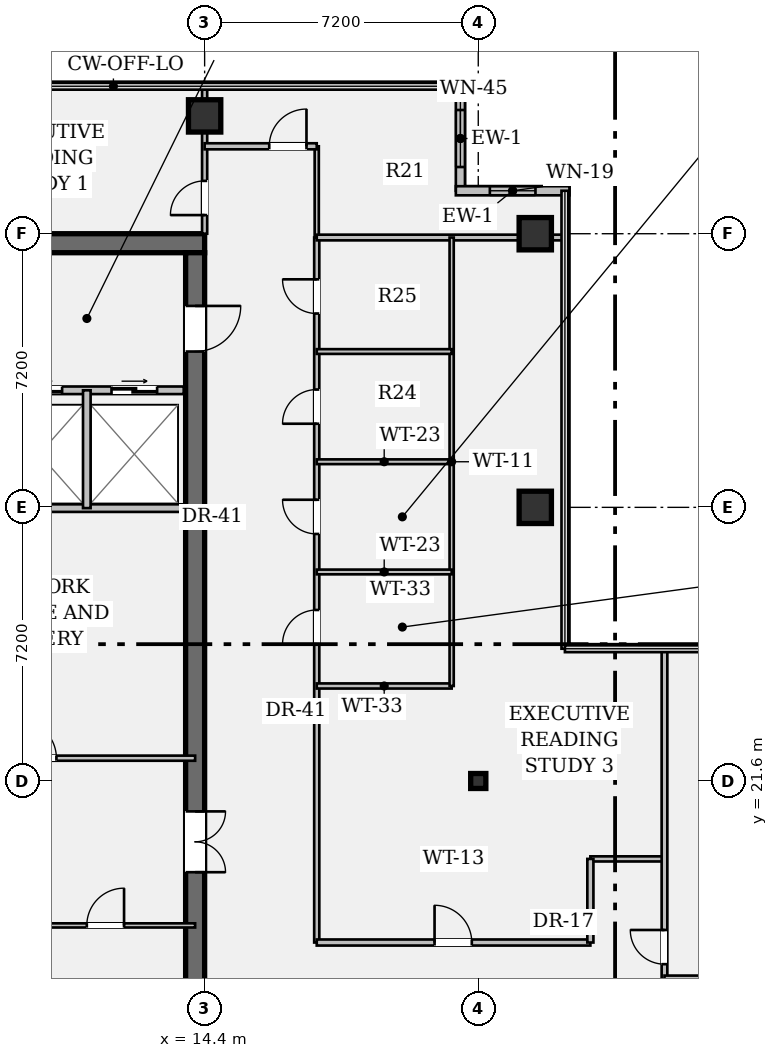
"""IFC4 building model, lengths in metres.
Left out: names, types, materials, properties, quantities, classifications, styles, units other than length and angle.
Written with IfcOpenShell. Run it as: python <this file> out.ifc"""

import sys

from ifc_helpers import new_model, si_unit, direction, frame, frame_2d, origin, origin_2d, place, context, subcontext, project, spatial, rectangle, hollow_rectangle, i_section, extrude, element, fill, save


model = new_model("IFC4")
c1 = context("Model", 3, precision=1e-05, world=origin(), true_north=direction((0.0, 1.0)))
c2 = subcontext(c1, "Body", "Model", "MODEL_VIEW")
j1 = project(units=[si_unit("LENGTHUNIT", "METRE"), si_unit("PLANEANGLEUNIT", "RADIAN")], contexts=[c1])
p1 = place(None, origin())
s1 = spatial("IfcSite", under=j1, at=p1, CompositionType="ELEMENT")
p2 = place(p1, origin())
s2 = spatial("IfcBuilding", under=s1, at=p2, CompositionType="ELEMENT")
p3 = place(p2, frame((0.0, 0.0, 176.75)))
s3 = spatial("IfcBuildingStorey", under=s2, at=p3, CompositionType="ELEMENT", Elevation=176.75)
p4 = place(p3, frame((0.5, 35.75, 0.0), z_axis=(0.0, 0.0, 1.0), x_axis=(1.0, 0.0, 0.0)))
e1 = element("IfcWall", 1, at=p4, inside=s3, PredefinedType="SHEAR", context=c2, shape_type="SweptSolid", body=[
    extrude(rectangle(XDim=13.9, YDim=0.5, at=frame_2d((6.95, 0.0))), origin(), (0.0, 0.0, 1.0), 3.24),
])
p5 = place(p3, frame((14.15, 35.5, 0.0), z_axis=(0.0, 0.0, 1.0), x_axis=(0.0, -1.0, 0.0)))
e2 = element("IfcWall", 2, at=p5, inside=s3, PredefinedType="SHEAR", context=c2, shape_type="SweptSolid", body=[
    extrude(rectangle(XDim=27.8, YDim=0.5, at=frame_2d((13.9, 0.0))), origin(), (0.0, 0.0, 1.0), 3.24),
])
p6 = place(p5, frame((1.4, 0.0, 0.0)))
e3 = element("IfcOpeningElement", 3, at=p6, cuts=e2, PredefinedType="OPENING", context=c2, shape_type="SweptSolid", body=[
    extrude(rectangle(XDim=1.2, YDim=2.15, at=frame_2d((0.6, 1.075))), frame((0.0, 0.262, 0.0), z_axis=(0.0, -1.0, 0.0), x_axis=(1.0, 0.0, 0.0)), (0.0, 0.0, 1.0), 0.524),
])
p7 = place(p5, frame((25.35, 0.0, 0.0)))
e4 = element("IfcOpeningElement", 4, at=p7, cuts=e2, PredefinedType="OPENING", context=c2, shape_type="SweptSolid", body=[
    extrude(rectangle(XDim=1.2, YDim=2.15, at=frame_2d((0.6, 1.075))), frame((0.0, 0.262, 0.0), z_axis=(0.0, -1.0, 0.0), x_axis=(1.0, 0.0, 0.0)), (0.0, 0.0, 1.0), 0.524),
])
p8 = place(p5, frame((14.7, 0.0, 0.0)))
e5 = element("IfcOpeningElement", 5, at=p8, cuts=e2, PredefinedType="OPENING", context=c2, shape_type="SweptSolid", body=[
    extrude(rectangle(XDim=1.6, YDim=2.2, at=frame_2d((0.8, 1.1))), frame((0.0, 0.262, 0.0), z_axis=(0.0, -1.0, 0.0), x_axis=(1.0, 0.0, 0.0)), (0.0, 0.0, 1.0), 0.524),
])
p9 = place(p3, frame((14.4, 39.1, 0.0), z_axis=(0.0, 0.0, 1.0), x_axis=(1.0, 0.0, 0.0)))
e6 = element("IfcColumn", 6, at=p9, inside=s3, PredefinedType="COLUMN", context=c2, shape_type="SweptSolid", body=[
    extrude(hollow_rectangle(XDim=0.85, YDim=0.85, WallThickness=0.05, at=origin_2d()), origin(), (0.0, 0.0, 1.0), 3.24),
])
p10 = place(p3, frame((21.6, 21.6, 0.0), z_axis=(0.0, 0.0, 1.0), x_axis=(1.0, 0.0, 0.0)))
e7 = element("IfcColumn", 7, at=p10, inside=s3, PredefinedType="COLUMN", context=c2, shape_type="SweptSolid", body=[
    extrude(i_section(OverallWidth=0.399, OverallDepth=0.394, WebThickness=0.023, FlangeThickness=0.037, FilletRadius=0.018, at=origin_2d()), origin(), (0.0, 0.0, 1.0), 3.24),
])
for number, where, z_axis, x_axis in (
    (8, (23.1, 28.8, 0.0), (0.0, 0.0, 1.0), (1.0, 0.0, 0.0)),
    (9, (23.1, 36.0, 0.0), (0.0, 0.0, 1.0), (1.0, 0.0, 0.0)),
):
    element("IfcColumn", number, at=place(p3, frame(where, z_axis=z_axis, x_axis=x_axis)), inside=s3, PredefinedType="COLUMN", context=c2, shape_type="SweptSolid", body=[
        extrude(hollow_rectangle(XDim=0.85, YDim=0.85, WallThickness=0.05, at=origin_2d()), origin(), (0.0, 0.0, 1.0), 3.24),
    ])
p11 = place(p3, frame((21.13, 39.88, 0.0), z_axis=(0.0, 0.0, 1.0), x_axis=(0.0, -1.0, 0.0)))
e10 = element("IfcWall", 10, at=p11, inside=s3, PredefinedType="STANDARD", context=c2, shape_type="SweptSolid", body=[
    extrude(rectangle(XDim=2.75, YDim=0.24, at=frame_2d((1.375, 0.0))), origin(), (0.0, 0.0, 1.0), 3.24),
])
p12 = place(p11, frame((0.625, 0.0, 0.95)))
e11 = element("IfcOpeningElement", 11, at=p12, cuts=e10, PredefinedType="OPENING", context=c2, shape_type="SweptSolid", body=[
    extrude(rectangle(XDim=1.5, YDim=1.8, at=frame_2d((0.75, 0.9))), frame((0.0, 0.132, 0.0), z_axis=(0.0, -1.0, 0.0), x_axis=(1.0, 0.0, 0.0)), (0.0, 0.0, 1.0), 0.264),
])
p13 = place(p3, frame((21.01, 37.13, 0.0), z_axis=(0.0, 0.0, 1.0), x_axis=(1.0, 0.0, 0.0)))
e12 = element("IfcWall", 12, at=p13, inside=s3, PredefinedType="STANDARD", context=c2, shape_type="SweptSolid", body=[
    extrude(rectangle(XDim=2.99, YDim=0.24, at=frame_2d((1.495, 0.0))), origin(), (0.0, 0.0, 1.0), 3.24),
])
p14 = place(p13, frame((0.895, 0.0, 0.95)))
e13 = element("IfcOpeningElement", 13, at=p14, cuts=e12, PredefinedType="OPENING", context=c2, shape_type="SweptSolid", body=[
    extrude(rectangle(XDim=1.2, YDim=1.8, at=frame_2d((0.6, 0.9))), frame((0.0, 0.132, 0.0), z_axis=(0.0, -1.0, 0.0), x_axis=(1.0, 0.0, 0.0)), (0.0, 0.0, 1.0), 0.264),
])
p15 = place(p3, frame((8.7, 31.88, 0.0), z_axis=(0.0, 0.0, 1.0), x_axis=(1.0, 0.0, 0.0)))
e14 = element("IfcWall", 14, at=p15, inside=s3, PredefinedType="PARTITIONING", context=c2, shape_type="SweptSolid", body=[
    extrude(rectangle(XDim=5.15, YDim=0.2, at=frame_2d((2.575, 0.0))), origin(), (0.0, 0.0, 1.0), 3.24),
])
p16 = place(p15, frame((0.75, 0.0, 0.0)))
e15 = element("IfcOpeningElement", 15, at=p16, cuts=e14, PredefinedType="OPENING", context=c2, shape_type="SweptSolid", body=[
    extrude(rectangle(XDim=1.2, YDim=2.2, at=frame_2d((0.6, 1.1))), frame((0.0, 0.112, 0.0), z_axis=(0.0, -1.0, 0.0), x_axis=(1.0, 0.0, 0.0)), (0.0, 0.0, 1.0), 0.224),
])
p17 = place(p15, frame((3.25, 0.0, 0.0)))
e16 = element("IfcOpeningElement", 16, at=p17, cuts=e14, PredefinedType="OPENING", context=c2, shape_type="SweptSolid", body=[
    extrude(rectangle(XDim=1.2, YDim=2.2, at=frame_2d((0.6, 1.1))), frame((0.0, 0.112, 0.0), z_axis=(0.0, -1.0, 0.0), x_axis=(1.0, 0.0, 0.0)), (0.0, 0.0, 1.0), 0.224),
])
p18 = place(p3, frame((8.7, 28.78, 0.0), z_axis=(0.0, 0.0, 1.0), x_axis=(1.0, 0.0, 0.0)))
e17 = element("IfcWall", 17, at=p18, inside=s3, PredefinedType="PARTITIONING", context=c2, shape_type="SweptSolid", body=[
    extrude(rectangle(XDim=5.15, YDim=0.2, at=frame_2d((2.575, 0.0))), origin(), (0.0, 0.0, 1.0), 3.24),
])
p19 = place(p3, frame((11.3, 28.78, 0.0), z_axis=(0.0, 0.0, 1.0), x_axis=(0.0, 1.0, 0.0)))
e18 = element("IfcWall", 18, at=p19, inside=s3, PredefinedType="PARTITIONING", context=c2, shape_type="SweptSolid", body=[
    extrude(rectangle(XDim=3.1, YDim=0.2, at=frame_2d((1.55, 0.0))), origin(), (0.0, 0.0, 1.0), 3.24),
])
p20 = place(p3, frame((7.1, 22.2, 0.0), z_axis=(0.0, 0.0, 1.0), x_axis=(1.0, 0.0, 0.0)))
e19 = element("IfcWall", 19, at=p20, inside=s3, PredefinedType="PARTITIONING", context=c2, shape_type="SweptSolid", body=[
    extrude(rectangle(XDim=7.05, YDim=0.135, at=frame_2d((3.525, 0.0))), origin(), (0.0, 0.0, 1.0), 3.24),
])
p21 = place(p20, frame((2.4, 0.0, 0.0)))
e20 = element("IfcOpeningElement", 20, at=p21, cuts=e19, PredefinedType="OPENING", context=c2, shape_type="SweptSolid", body=[
    extrude(rectangle(XDim=1.0, YDim=2.15, at=frame_2d((0.5, 1.075))), frame((0.0, 0.08, 0.0), z_axis=(0.0, -1.0, 0.0), x_axis=(1.0, 0.0, 0.0)), (0.0, 0.0, 1.0), 0.159),
])
p22 = place(p3, frame((5.15, 17.8, 0.0), z_axis=(0.0, 0.0, 1.0), x_axis=(1.0, 0.0, 0.0)))
e21 = element("IfcWall", 21, at=p22, inside=s3, PredefinedType="PARTITIONING", context=c2, shape_type="SweptSolid", body=[
    extrude(rectangle(XDim=9.0, YDim=0.11, at=frame_2d((4.5, 0.0))), origin(), (0.0, 0.0, 1.0), 3.24),
])
p23 = place(p22, frame((2.65, 0.0, 0.0)))
e22 = element("IfcOpeningElement", 22, at=p23, cuts=e21, PredefinedType="OPENING", context=c2, shape_type="SweptSolid", body=[
    extrude(rectangle(XDim=0.9, YDim=2.15, at=frame_2d((0.45, 1.075))), frame((0.0, 0.067, 0.0), z_axis=(0.0, -1.0, 0.0), x_axis=(1.0, 0.0, 0.0)), (0.0, 0.0, 1.0), 0.134),
])
p24 = place(p22, frame((6.15, 0.0, 0.0)))
e23 = element("IfcOpeningElement", 23, at=p24, cuts=e21, PredefinedType="OPENING", context=c2, shape_type="SweptSolid", body=[
    extrude(rectangle(XDim=0.98, YDim=2.15, at=frame_2d((0.49, 1.075))), frame((0.0, 0.067, 0.0), z_axis=(0.0, -1.0, 0.0), x_axis=(1.0, 0.0, 0.0)), (0.0, 0.0, 1.0), 0.134),
])
p25 = place(p3, frame((17.35, 17.35, 0.0), z_axis=(0.0, 0.0, 1.0), x_axis=(0.0, 1.0, 0.0)))
e24 = element("IfcWall", 24, at=p25, inside=s3, PredefinedType="PARTITIONING", context=c2, shape_type="SweptSolid", body=[
    extrude(rectangle(XDim=18.55, YDim=0.135, at=frame_2d((9.275, 0.0))), origin(), (0.0, 0.0, 1.0), 2.603),
])
p26 = place(p25, frame((7.85, 0.0, 0.0)))
e25 = element("IfcOpeningElement", 25, at=p26, cuts=e24, PredefinedType="OPENING", context=c2, shape_type="SweptSolid", body=[
    extrude(rectangle(XDim=0.9, YDim=2.15, at=frame_2d((0.45, 1.075))), frame((0.0, 0.08, 0.0), z_axis=(0.0, -1.0, 0.0), x_axis=(1.0, 0.0, 0.0)), (0.0, 0.0, 1.0), 0.159),
])
p27 = place(p25, frame((10.75, 0.0, 0.0)))
e26 = element("IfcOpeningElement", 26, at=p27, cuts=e24, PredefinedType="OPENING", context=c2, shape_type="SweptSolid", body=[
    extrude(rectangle(XDim=0.9, YDim=2.15, at=frame_2d((0.45, 1.075))), frame((0.0, 0.08, 0.0), z_axis=(0.0, -1.0, 0.0), x_axis=(1.0, 0.0, 0.0)), (0.0, 0.0, 1.0), 0.159),
])
p28 = place(p25, frame((13.65, 0.0, 0.0)))
e27 = element("IfcOpeningElement", 27, at=p28, cuts=e24, PredefinedType="OPENING", context=c2, shape_type="SweptSolid", body=[
    extrude(rectangle(XDim=0.9, YDim=2.15, at=frame_2d((0.45, 1.075))), frame((0.0, 0.08, 0.0), z_axis=(0.0, -1.0, 0.0), x_axis=(1.0, 0.0, 0.0)), (0.0, 0.0, 1.0), 0.159),
])
p29 = place(p25, frame((16.55, 0.0, 0.0)))
e28 = element("IfcOpeningElement", 28, at=p29, cuts=e24, PredefinedType="OPENING", context=c2, shape_type="SweptSolid", body=[
    extrude(rectangle(XDim=0.9, YDim=2.15, at=frame_2d((0.45, 1.075))), frame((0.0, 0.08, 0.0), z_axis=(0.0, -1.0, 0.0), x_axis=(1.0, 0.0, 0.0)), (0.0, 0.0, 1.0), 0.159),
])
p30 = place(p3, frame((17.35, 17.35, 0.0), z_axis=(0.0, 0.0, 1.0), x_axis=(1.0, 0.0, 0.0)))
e29 = element("IfcWall", 29, at=p30, inside=s3, PredefinedType="PARTITIONING", context=c2, shape_type="SweptSolid", body=[
    extrude(rectangle(XDim=7.2, YDim=0.16, at=frame_2d((3.6, 0.0))), origin(), (0.0, 0.0, 1.0), 2.603),
])
p31 = place(p30, frame((3.1, 0.0, 0.0)))
e30 = element("IfcOpeningElement", 30, at=p31, cuts=e29, PredefinedType="OPENING", context=c2, shape_type="SweptSolid", body=[
    extrude(rectangle(XDim=0.98, YDim=2.15, at=frame_2d((0.49, 1.075))), frame((0.0, 0.092, 0.0), z_axis=(0.0, -1.0, 0.0), x_axis=(1.0, 0.0, 0.0)), (0.0, 0.0, 1.0), 0.184),
])
p32 = place(p3, frame((24.55, 19.55, 0.0), z_axis=(0.0, 0.0, 1.0), x_axis=(1.0, 0.0, 0.0)))
e31 = element("IfcWall", 31, at=p32, inside=s3, PredefinedType="PARTITIONING", context=c2, shape_type="SweptSolid", body=[
    extrude(rectangle(XDim=1.95, YDim=0.135, at=frame_2d((0.975, 0.0))), origin(), (0.0, 0.0, 1.0), 2.808),
])
p33 = place(p3, frame((24.55, 17.35, 0.0), z_axis=(0.0, 0.0, 1.0), x_axis=(0.0, 1.0, 0.0)))
e32 = element("IfcWall", 32, at=p33, inside=s3, PredefinedType="PARTITIONING", context=c2, shape_type="SweptSolid", body=[
    extrude(rectangle(XDim=2.2, YDim=0.16, at=frame_2d((1.1, 0.0))), origin(), (0.0, 0.0, 1.0), 3.24),
])
p34 = place(p3, frame((26.5, 3.32, 0.0), z_axis=(0.0, 0.0, 1.0), x_axis=(0.0, 1.0, 0.0)))
e33 = element("IfcWall", 33, at=p34, inside=s3, PredefinedType="PARTITIONING", context=c2, shape_type="SweptSolid", body=[
    extrude(rectangle(XDim=21.76, YDim=0.15, at=frame_2d((10.88, 0.0))), origin(), (0.0, 0.0, 1.0), 2.603),
])
p35 = place(p34, frame((11.79, 0.0, 0.0)))
e34 = element("IfcOpeningElement", 34, at=p35, cuts=e33, PredefinedType="OPENING", context=c2, shape_type="SweptSolid", body=[
    extrude(rectangle(XDim=0.9, YDim=2.15, at=frame_2d((0.45, 1.075))), frame((0.0, 0.087, 0.0), z_axis=(0.0, -1.0, 0.0), x_axis=(1.0, 0.0, 0.0)), (0.0, 0.0, 1.0), 0.174),
])
p36 = place(p34, frame((13.46, 0.0, 0.0)))
e35 = element("IfcOpeningElement", 35, at=p36, cuts=e33, PredefinedType="OPENING", context=c2, shape_type="SweptSolid", body=[
    extrude(rectangle(XDim=0.9, YDim=2.15, at=frame_2d((0.45, 1.075))), frame((0.0, 0.087, 0.0), z_axis=(0.0, -1.0, 0.0), x_axis=(1.0, 0.0, 0.0)), (0.0, 0.0, 1.0), 0.174),
])
p37 = place(p3, frame((14.4, 36.0, 0.0), z_axis=(0.0, 0.0, 1.0), x_axis=(0.0, 1.0, 0.0)))
e36 = element("IfcWall", 36, at=p37, inside=s3, PredefinedType="PARTITIONING", context=c2, shape_type="SweptSolid", body=[
    extrude(rectangle(XDim=3.88, YDim=0.135, at=frame_2d((1.94, 0.0))), origin(), (0.0, 0.0, 1.0), 2.603),
])
p38 = place(p37, frame((0.49, 0.0, 0.0)))
e37 = element("IfcOpeningElement", 37, at=p38, cuts=e36, PredefinedType="OPENING", context=c2, shape_type="SweptSolid", body=[
    extrude(rectangle(XDim=0.9, YDim=2.15, at=frame_2d((0.45, 1.075))), frame((0.0, 0.08, 0.0), z_axis=(0.0, -1.0, 0.0), x_axis=(1.0, 0.0, 0.0)), (0.0, 0.0, 1.0), 0.159),
])
p39 = place(p3, frame((17.35, 35.9, 0.0), z_axis=(0.0, 0.0, 1.0), x_axis=(0.0, 1.0, 0.0)))
e38 = element("IfcWall", 38, at=p39, inside=s3, PredefinedType="PARTITIONING", context=c2, shape_type="SweptSolid", body=[
    extrude(rectangle(XDim=2.4, YDim=0.11, at=frame_2d((1.2, 0.0))), origin(), (0.0, 0.0, 1.0), 2.603),
])
p40 = place(p3, frame((14.4, 38.3, 0.0), z_axis=(0.0, 0.0, 1.0), x_axis=(1.0, 0.0, 0.0)))
e39 = element("IfcWall", 39, at=p40, inside=s3, PredefinedType="PARTITIONING", context=c2, shape_type="SweptSolid", body=[
    extrude(rectangle(XDim=2.95, YDim=0.16, at=frame_2d((1.475, 0.0))), origin(), (0.0, 0.0, 1.0), 2.603),
])
p41 = place(p40, frame((1.7, 0.0, 0.0)))
e40 = element("IfcOpeningElement", 40, at=p41, cuts=e39, PredefinedType="OPENING", context=c2, shape_type="SweptSolid", body=[
    extrude(rectangle(XDim=0.98, YDim=2.15, at=frame_2d((0.49, 1.075))), frame((0.0, 0.092, 0.0), z_axis=(0.0, -1.0, 0.0), x_axis=(1.0, 0.0, 0.0)), (0.0, 0.0, 1.0), 0.184),
])
p42 = place(p3, frame((17.35, 35.9, 0.0), z_axis=(0.0, 0.0, 1.0), x_axis=(1.0, 0.0, 0.0)))
e41 = element("IfcWall", 41, at=p42, inside=s3, PredefinedType="PARTITIONING", context=c2, shape_type="SweptSolid", body=[
    extrude(rectangle(XDim=6.53, YDim=0.15, at=frame_2d((3.265, 0.0))), origin(), (0.0, 0.0, 1.0), 2.603),
])
p43 = place(p3, frame((17.35, 24.1, 0.0), z_axis=(0.0, 0.0, 1.0), x_axis=(1.0, 0.0, 0.0)))
e42 = element("IfcWall", 42, at=p43, inside=s3, PredefinedType="PARTITIONING", context=c2, shape_type="SweptSolid", body=[
    extrude(rectangle(XDim=3.55, YDim=0.135, at=frame_2d((1.775, 0.0))), origin(), (0.0, 0.0, 1.0), 2.808),
])
p44 = place(p3, frame((20.9, 24.1, 0.0), z_axis=(0.0, 0.0, 1.0), x_axis=(0.0, 1.0, 0.0)))
e43 = element("IfcWall", 43, at=p44, inside=s3, PredefinedType="PARTITIONING", context=c2, shape_type="SweptSolid", body=[
    extrude(rectangle(XDim=11.8, YDim=0.11, at=frame_2d((5.9, 0.0))), origin(), (0.0, 0.0, 1.0), 2.603),
])
for number, where, z_axis, x_axis in (
    (44, (17.35, 27.1, 0.0), (0.0, 0.0, 1.0), (1.0, 0.0, 0.0)),
    (45, (17.35, 30.0, 0.0), (0.0, 0.0, 1.0), (1.0, 0.0, 0.0)),
    (46, (17.35, 32.9, 0.0), (0.0, 0.0, 1.0), (1.0, 0.0, 0.0)),
):
    element("IfcWall", number, at=place(p3, frame(where, z_axis=z_axis, x_axis=x_axis)), inside=s3, PredefinedType="PARTITIONING", context=c2, shape_type="SweptSolid", body=[
        extrude(rectangle(XDim=3.55, YDim=0.125, at=frame_2d((1.775, 0.0))), origin(), (0.0, 0.0, 1.0), 2.808),
    ])
p45 = place(p3, frame((26.5, 16.4, 0.0), z_axis=(0.0, 0.0, 1.0), x_axis=(1.0, 0.0, 0.0)))
e47 = element("IfcWall", 47, at=p45, inside=s3, PredefinedType="PARTITIONING", context=c2, shape_type="SweptSolid", body=[
    extrude(rectangle(XDim=17.38, YDim=0.16, at=frame_2d((8.69, 0.0))), origin(), (0.0, 0.0, 1.0), 2.603),
])
p46 = place(p12, origin())
e48 = element("IfcWindow", 48, at=p46, inside=s3, PartitioningType="SINGLE_PANEL", PredefinedType="WINDOW", context=c2, shape_type="SweptSolid", body=[
    extrude(rectangle(XDim=1.5, YDim=1.8, at=frame_2d((0.75, 0.9))), frame((0.0, 0.03, 0.0), z_axis=(0.0, -1.0, 0.0), x_axis=(1.0, 0.0, 0.0)), (0.0, 0.0, 1.0), 0.06),
])
fill(e11, e48)
p47 = place(p14, origin())
e49 = element("IfcWindow", 49, at=p47, inside=s3, PartitioningType="SINGLE_PANEL", PredefinedType="WINDOW", context=c2, shape_type="SweptSolid", body=[
    extrude(rectangle(XDim=1.2, YDim=1.8, at=frame_2d((0.6, 0.9))), frame((0.0, 0.03, 0.0), z_axis=(0.0, -1.0, 0.0), x_axis=(1.0, 0.0, 0.0)), (0.0, 0.0, 1.0), 0.06),
])
fill(e13, e49)
p48 = place(p6, origin())
e50 = element("IfcDoor", 50, at=p48, inside=s3, OperationType="SINGLE_SWING_LEFT", PredefinedType="DOOR", context=c2, shape_type="SweptSolid", body=[
    extrude(rectangle(XDim=1.2, YDim=2.15, at=frame_2d((0.6, 1.075))), frame((0.0, 0.025, 0.0), z_axis=(0.0, -1.0, 0.0), x_axis=(1.0, 0.0, 0.0)), (0.0, 0.0, 1.0), 0.05),
])
fill(e3, e50)
p49 = place(p16, origin())
e51 = element("IfcDoor", 51, at=p49, inside=s3, OperationType="DOUBLE_DOOR_SLIDING", PredefinedType="DOOR", context=c2, shape_type="SweptSolid", body=[
    extrude(rectangle(XDim=1.2, YDim=2.2, at=frame_2d((0.6, 1.1))), frame((0.0, 0.025, 0.0), z_axis=(0.0, -1.0, 0.0), x_axis=(1.0, 0.0, 0.0)), (0.0, 0.0, 1.0), 0.05),
])
fill(e15, e51)
p50 = place(p17, origin())
e52 = element("IfcDoor", 52, at=p50, inside=s3, OperationType="DOUBLE_DOOR_SLIDING", PredefinedType="DOOR", context=c2, shape_type="SweptSolid", body=[
    extrude(rectangle(XDim=1.2, YDim=2.2, at=frame_2d((0.6, 1.1))), frame((0.0, 0.025, 0.0), z_axis=(0.0, -1.0, 0.0), x_axis=(1.0, 0.0, 0.0)), (0.0, 0.0, 1.0), 0.05),
])
fill(e16, e52)
p51 = place(p8, origin())
e53 = element("IfcDoor", 53, at=p51, inside=s3, OperationType="DOUBLE_DOOR_SINGLE_SWING", PredefinedType="DOOR", context=c2, shape_type="SweptSolid", body=[
    extrude(rectangle(XDim=1.6, YDim=2.2, at=frame_2d((0.8, 1.1))), frame((0.0, 0.025, 0.0), z_axis=(0.0, -1.0, 0.0), x_axis=(1.0, 0.0, 0.0)), (0.0, 0.0, 1.0), 0.05),
])
fill(e5, e53)
p52 = place(p21, origin())
e54 = element("IfcDoor", 54, at=p52, inside=s3, OperationType="SINGLE_SWING_LEFT", PredefinedType="DOOR", context=c2, shape_type="SweptSolid", body=[
    extrude(rectangle(XDim=1.0, YDim=2.15, at=frame_2d((0.5, 1.075))), frame((0.0, 0.025, 0.0), z_axis=(0.0, -1.0, 0.0), x_axis=(1.0, 0.0, 0.0)), (0.0, 0.0, 1.0), 0.05),
])
fill(e20, e54)
p53 = place(p24, origin())
e55 = element("IfcDoor", 55, at=p53, inside=s3, OperationType="SINGLE_SWING_RIGHT", PredefinedType="DOOR", context=c2, shape_type="SweptSolid", body=[
    extrude(rectangle(XDim=0.98, YDim=2.15, at=frame_2d((0.49, 1.075))), frame((0.0, 0.025, 0.0), z_axis=(0.0, -1.0, 0.0), x_axis=(1.0, 0.0, 0.0)), (0.0, 0.0, 1.0), 0.05),
])
fill(e23, e55)
p54 = place(p38, origin())
e56 = element("IfcDoor", 56, at=p54, inside=s3, OperationType="SINGLE_SWING_LEFT", PredefinedType="DOOR", context=c2, shape_type="SweptSolid", body=[
    extrude(rectangle(XDim=0.9, YDim=2.15, at=frame_2d((0.45, 1.075))), frame((0.0, 0.025, 0.0), z_axis=(0.0, -1.0, 0.0), x_axis=(1.0, 0.0, 0.0)), (0.0, 0.0, 1.0), 0.05),
])
fill(e37, e56)
p55 = place(p41, origin())
e57 = element("IfcDoor", 57, at=p55, inside=s3, OperationType="SINGLE_SWING_RIGHT", PredefinedType="DOOR", context=c2, shape_type="SweptSolid", body=[
    extrude(rectangle(XDim=0.98, YDim=2.15, at=frame_2d((0.49, 1.075))), frame((0.0, 0.025, 0.0), z_axis=(0.0, -1.0, 0.0), x_axis=(1.0, 0.0, 0.0)), (0.0, 0.0, 1.0), 0.05),
])
fill(e40, e57)
p56 = place(p26, origin())
e58 = element("IfcDoor", 58, at=p56, inside=s3, OperationType="SINGLE_SWING_LEFT", PredefinedType="DOOR", context=c2, shape_type="SweptSolid", body=[
    extrude(rectangle(XDim=0.9, YDim=2.15, at=frame_2d((0.45, 1.075))), frame((0.0, 0.025, 0.0), z_axis=(0.0, -1.0, 0.0), x_axis=(1.0, 0.0, 0.0)), (0.0, 0.0, 1.0), 0.05),
])
fill(e25, e58)
p57 = place(p27, origin())
e59 = element("IfcDoor", 59, at=p57, inside=s3, OperationType="SINGLE_SWING_RIGHT", PredefinedType="DOOR", context=c2, shape_type="SweptSolid", body=[
    extrude(rectangle(XDim=0.9, YDim=2.15, at=frame_2d((0.45, 1.075))), frame((0.0, 0.025, 0.0), z_axis=(0.0, -1.0, 0.0), x_axis=(1.0, 0.0, 0.0)), (0.0, 0.0, 1.0), 0.05),
])
fill(e26, e59)
p58 = place(p28, origin())
e60 = element("IfcDoor", 60, at=p58, inside=s3, OperationType="SINGLE_SWING_LEFT", PredefinedType="DOOR", context=c2, shape_type="SweptSolid", body=[
    extrude(rectangle(XDim=0.9, YDim=2.15, at=frame_2d((0.45, 1.075))), frame((0.0, 0.025, 0.0), z_axis=(0.0, -1.0, 0.0), x_axis=(1.0, 0.0, 0.0)), (0.0, 0.0, 1.0), 0.05),
])
fill(e27, e60)
p59 = place(p29, origin())
e61 = element("IfcDoor", 61, at=p59, inside=s3, OperationType="SINGLE_SWING_RIGHT", PredefinedType="DOOR", context=c2, shape_type="SweptSolid", body=[
    extrude(rectangle(XDim=0.9, YDim=2.15, at=frame_2d((0.45, 1.075))), frame((0.0, 0.025, 0.0), z_axis=(0.0, -1.0, 0.0), x_axis=(1.0, 0.0, 0.0)), (0.0, 0.0, 1.0), 0.05),
])
fill(e28, e61)
p60 = place(p31, origin())
e62 = element("IfcDoor", 62, at=p60, inside=s3, OperationType="SINGLE_SWING_LEFT", PredefinedType="DOOR", context=c2, shape_type="SweptSolid", body=[
    extrude(rectangle(XDim=0.98, YDim=2.15, at=frame_2d((0.49, 1.075))), frame((0.0, 0.025, 0.0), z_axis=(0.0, -1.0, 0.0), x_axis=(1.0, 0.0, 0.0)), (0.0, 0.0, 1.0), 0.05),
])
fill(e30, e62)
p61 = place(p36, origin())
e63 = element("IfcDoor", 63, at=p61, inside=s3, OperationType="SINGLE_SWING_RIGHT", PredefinedType="DOOR", context=c2, shape_type="SweptSolid", body=[
    extrude(rectangle(XDim=0.9, YDim=2.15, at=frame_2d((0.45, 1.075))), frame((0.0, 0.025, 0.0), z_axis=(0.0, -1.0, 0.0), x_axis=(1.0, 0.0, 0.0)), (0.0, 0.0, 1.0), 0.05),
])
fill(e35, e63)
save(model, sys.argv[1])
